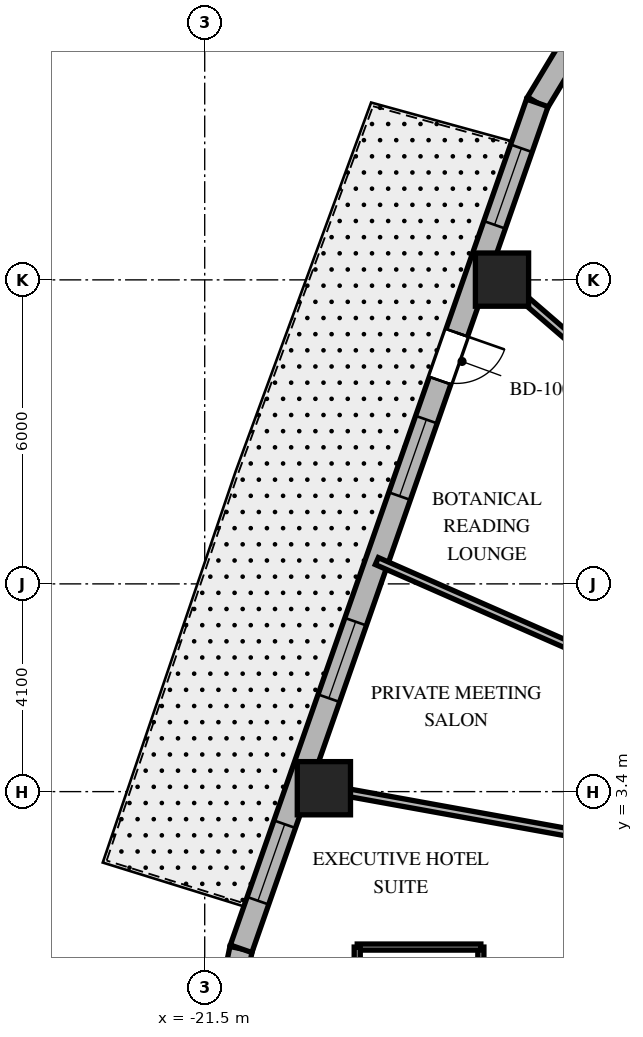
"""IFC4 building model, lengths in metres.
Left out: names, types, materials, properties, quantities, classifications, styles, units other than length and angle.
Written with IfcOpenShell. Run it as: python <this file> out.ifc"""

import sys

from ifc_helpers import new_model, si_unit, direction, frame, frame_2d, origin, origin_2d, place, context, subcontext, project, spatial, rectangle, extrude, element, fill, save


model = new_model("IFC4")
c1 = context("Model", 3, precision=1e-05, world=origin(), true_north=direction((0.0, 1.0)))
c2 = subcontext(c1, "Body", "Model", "MODEL_VIEW")
j1 = project(units=[si_unit("LENGTHUNIT", "METRE"), si_unit("PLANEANGLEUNIT", "RADIAN")], contexts=[c1])
p1 = place(None, origin())
s1 = spatial("IfcSite", under=j1, at=p1, CompositionType="ELEMENT")
p2 = place(p1, origin())
s2 = spatial("IfcBuilding", under=s1, at=p2, CompositionType="ELEMENT")
p3 = place(p2, frame((0.0, 0.0, 197.8)))
s3 = spatial("IfcBuildingStorey", under=s2, at=p3, CompositionType="ELEMENT", Elevation=197.8)
for number, where, z_axis, x_axis in (
    (1, (-15.633, 13.505, 0.0), (0.0, 0.0, 1.0), (1.0, 0.0, 0.0)),
    (2, (-19.148, 3.467, 0.0), (0.0, 0.0, 1.0), (1.0, 0.0, 0.0)),
):
    element("IfcColumn", number, at=place(p3, frame(where, z_axis=z_axis, x_axis=x_axis)), inside=s3, PredefinedType="COLUMN", context=c2, shape_type="SweptSolid", body=[
        extrude(rectangle(XDim=1.05, YDim=1.05, at=origin_2d()), origin(), (0.0, 0.0, 1.0), 3.7),
    ])
p4 = place(p3, frame((-14.214, 18.192, 0.0), z_axis=(0.0, 0.0, 1.0), x_axis=(-0.516340945502, -0.856383108193, 0.0)))
e3 = element("IfcWall", 3, at=p4, inside=s3, PredefinedType="SOLIDWALL", context=c2, shape_type="SweptSolid", body=[
    extrude(rectangle(XDim=1.4, YDim=0.45, at=frame_2d((0.7, 0.0))), origin(), (0.0, 0.0, 1.0), 3.35),
])
p5 = place(p3, frame((-20.782, 0.298, 0.0), z_axis=(0.0, 0.0, 1.0), x_axis=(-0.202570068411, -0.979267771033, 0.0)))
e4 = element("IfcWall", 4, at=p5, inside=s3, PredefinedType="SOLIDWALL", context=c2, shape_type="SweptSolid", body=[
    extrude(rectangle(XDim=0.909, YDim=0.45, at=frame_2d((0.454, 0.0))), origin(), (0.0, 0.0, 1.0), 3.35),
])
p6 = place(p3, frame((-14.937, 16.993, 0.0), z_axis=(0.0, 0.0, 1.0), x_axis=(-0.330431575061, -0.943829949834, 0.0)))
e5 = element("IfcWall", 5, at=p6, inside=s3, PredefinedType="SOLIDWALL", context=c2, shape_type="SweptSolid", body=[
    extrude(rectangle(XDim=17.689, YDim=0.45, at=frame_2d((8.844, 0.0))), origin(), (0.0, 0.0, 1.0), 3.35),
])
p7 = place(p6, frame((4.807, 0.0, 0.0)))
e6 = element("IfcOpeningElement", 6, at=p7, cuts=e5, PredefinedType="OPENING", context=c2, shape_type="SweptSolid", body=[
    extrude(rectangle(XDim=1.0, YDim=2.15, at=frame_2d((0.5, 1.075))), frame((0.0, 0.235, 0.0), z_axis=(0.0, -1.0, 0.0), x_axis=(1.0, 0.0, 0.0)), (0.0, 0.0, 1.0), 0.47),
])
p8 = place(p6, frame((0.95, 0.0, 0.8)))
e7 = element("IfcOpeningElement", 7, at=p8, cuts=e5, PredefinedType="OPENING", context=c2, shape_type="SweptSolid", body=[
    extrude(rectangle(XDim=1.6, YDim=1.75, at=frame_2d((0.8, 0.875))), frame((0.0, 0.235, 0.0), z_axis=(0.0, -1.0, 0.0), x_axis=(1.0, 0.0, 0.0)), (0.0, 0.0, 1.0), 0.47),
])
p9 = place(p6, frame((6.623, 0.0, 0.8)))
e8 = element("IfcOpeningElement", 8, at=p9, cuts=e5, PredefinedType="OPENING", context=c2, shape_type="SweptSolid", body=[
    extrude(rectangle(XDim=1.6, YDim=1.75, at=frame_2d((0.8, 0.875))), frame((0.0, 0.235, 0.0), z_axis=(0.0, -1.0, 0.0), x_axis=(1.0, 0.0, 0.0)), (0.0, 0.0, 1.0), 0.47),
])
p10 = place(p6, frame((10.849, 0.0, 0.8)))
e9 = element("IfcOpeningElement", 9, at=p10, cuts=e5, PredefinedType="OPENING", context=c2, shape_type="SweptSolid", body=[
    extrude(rectangle(XDim=1.6, YDim=1.75, at=frame_2d((0.8, 0.875))), frame((0.0, 0.235, 0.0), z_axis=(0.0, -1.0, 0.0), x_axis=(1.0, 0.0, 0.0)), (0.0, 0.0, 1.0), 0.47),
])
p11 = place(p6, frame((15.084, 0.0, 0.8)))
e10 = element("IfcOpeningElement", 10, at=p11, cuts=e5, PredefinedType="OPENING", context=c2, shape_type="SweptSolid", body=[
    extrude(rectangle(XDim=1.6, YDim=1.75, at=frame_2d((0.8, 0.875))), frame((0.0, 0.235, 0.0), z_axis=(0.0, -1.0, 0.0), x_axis=(1.0, 0.0, 0.0)), (0.0, 0.0, 1.0), 0.47),
])
p12 = place(p3, frame((-13.35, 11.533, 0.0), z_axis=(0.0, 0.0, 1.0), x_axis=(-0.756711647314, 0.65374879183, 0.0)))
e11 = element("IfcWall", 11, at=p12, inside=s3, PredefinedType="PARTITIONING", context=c2, shape_type="SweptSolid", body=[
    extrude(rectangle(XDim=3.55, YDim=0.15, at=frame_2d((1.775, 0.0))), origin(), (0.0, 0.0, 1.0), 2.59),
])
p13 = place(p3, frame((-13.35, 5.863, 0.0), z_axis=(0.0, 0.0, 1.0), x_axis=(-0.9155832175, 0.402128551376, 0.0)))
e12 = element("IfcWall", 12, at=p13, inside=s3, PredefinedType="PARTITIONING", context=c2, shape_type="SweptSolid", body=[
    extrude(rectangle(XDim=5.191, YDim=0.15, at=frame_2d((2.595, 0.0))), origin(), (0.0, 0.0, 1.0), 2.59),
])
p14 = place(p3, frame((-13.35, 2.417, 0.0), z_axis=(0.0, 0.0, 1.0), x_axis=(-0.98399796473, 0.178179699761, 0.0)))
e13 = element("IfcWall", 13, at=p14, inside=s3, PredefinedType="PARTITIONING", context=c2, shape_type="SweptSolid", body=[
    extrude(rectangle(XDim=6.393, YDim=0.15, at=frame_2d((3.197, 0.0))), origin(), (0.0, 0.0, 1.0), 2.59),
])
p15 = place(p3, frame((-16.05, -2.278, 0.0), z_axis=(0.0, 0.0, 1.0), x_axis=(0.0, 1.0, 0.0)))
e14 = element("IfcWall", 14, at=p15, inside=s3, PredefinedType="PARTITIONING", context=c2, shape_type="SweptSolid", body=[
    extrude(rectangle(XDim=2.61, YDim=0.12, at=frame_2d((1.305, 0.0))), origin(), (0.0, 0.0, 1.0), 3.35),
])
p16 = place(p3, frame((-16.05, 0.332, 0.0), z_axis=(0.0, 0.0, 1.0), x_axis=(-1.0, 0.0, 0.0)))
e15 = element("IfcWall", 15, at=p16, inside=s3, PredefinedType="PARTITIONING", context=c2, shape_type="SweptSolid", body=[
    extrude(rectangle(XDim=2.44, YDim=0.12, at=frame_2d((1.22, 0.0))), origin(), (0.0, 0.0, 1.0), 3.35),
])
p17 = place(p3, frame((-18.49, 0.332, 0.0), z_axis=(0.0, 0.0, 1.0), x_axis=(0.0, -1.0, 0.0)))
e16 = element("IfcWall", 16, at=p17, inside=s3, PredefinedType="PARTITIONING", context=c2, shape_type="SweptSolid", body=[
    extrude(rectangle(XDim=2.61, YDim=0.12, at=frame_2d((1.305, 0.0))), origin(), (0.0, 0.0, 1.0), 3.35),
])
p18 = place(p7, origin())
e17 = element("IfcDoor", 17, at=p18, inside=s3, OperationType="SINGLE_SWING_LEFT", PredefinedType="DOOR", context=c2, shape_type="SweptSolid", body=[
    extrude(rectangle(XDim=1.0, YDim=2.15, at=frame_2d((0.5, 1.075))), frame((0.0, 0.025, 0.0), z_axis=(0.0, -1.0, 0.0), x_axis=(1.0, 0.0, 0.0)), (0.0, 0.0, 1.0), 0.05),
])
fill(e6, e17)
p19 = place(p8, origin())
e18 = element("IfcWindow", 18, at=p19, inside=s3, PartitioningType="SINGLE_PANEL", PredefinedType="WINDOW", context=c2, shape_type="SweptSolid", body=[
    extrude(rectangle(XDim=1.6, YDim=1.75, at=frame_2d((0.8, 0.875))), frame((0.0, 0.03, 0.0), z_axis=(0.0, -1.0, 0.0), x_axis=(1.0, 0.0, 0.0)), (0.0, 0.0, 1.0), 0.06),
])
fill(e7, e18)
p20 = place(p9, origin())
e19 = element("IfcWindow", 19, at=p20, inside=s3, PartitioningType="SINGLE_PANEL", PredefinedType="WINDOW", context=c2, shape_type="SweptSolid", body=[
    extrude(rectangle(XDim=1.6, YDim=1.75, at=frame_2d((0.8, 0.875))), frame((0.0, 0.03, 0.0), z_axis=(0.0, -1.0, 0.0), x_axis=(1.0, 0.0, 0.0)), (0.0, 0.0, 1.0), 0.06),
])
fill(e8, e19)
p21 = place(p10, origin())
e20 = element("IfcWindow", 20, at=p21, inside=s3, PartitioningType="SINGLE_PANEL", PredefinedType="WINDOW", context=c2, shape_type="SweptSolid", body=[
    extrude(rectangle(XDim=1.6, YDim=1.75, at=frame_2d((0.8, 0.875))), frame((0.0, 0.03, 0.0), z_axis=(0.0, -1.0, 0.0), x_axis=(1.0, 0.0, 0.0)), (0.0, 0.0, 1.0), 0.06),
])
fill(e9, e20)
p22 = place(p11, origin())
e21 = element("IfcWindow", 21, at=p22, inside=s3, PartitioningType="SINGLE_PANEL", PredefinedType="WINDOW", context=c2, shape_type="SweptSolid", body=[
    extrude(rectangle(XDim=1.6, YDim=1.75, at=frame_2d((0.8, 0.875))), frame((0.0, 0.03, 0.0), z_axis=(0.0, -1.0, 0.0), x_axis=(1.0, 0.0, 0.0)), (0.0, 0.0, 1.0), 0.06),
])
fill(e10, e21)
save(model, sys.argv[1])
